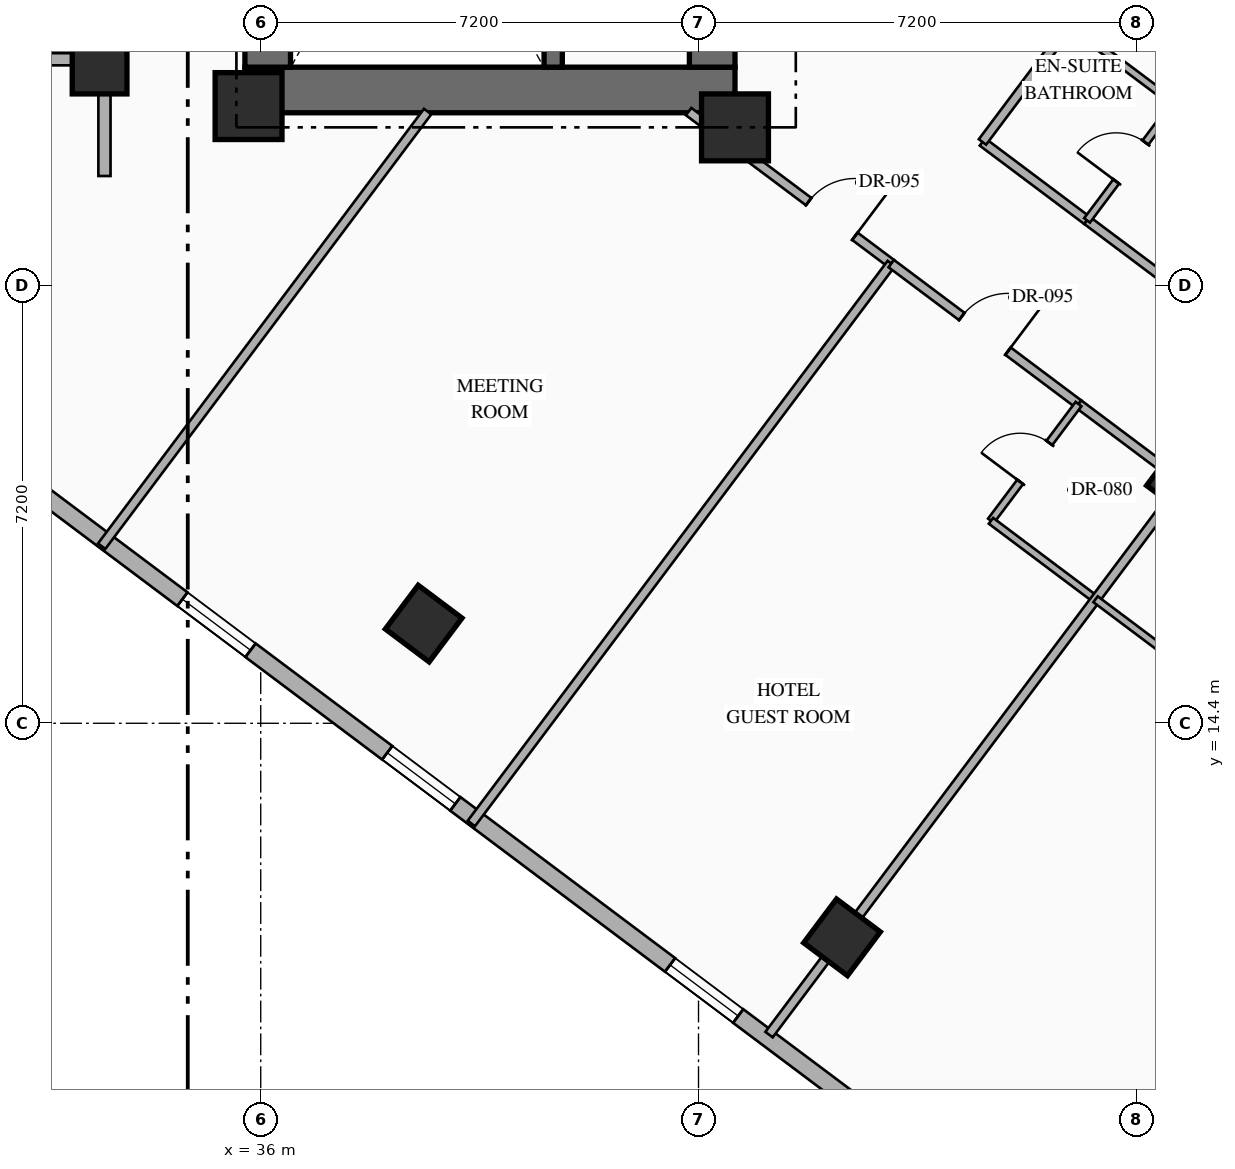
"""IFC4 building model, lengths in metres.
Left out: names, types, materials, properties, quantities, classifications, styles, units other than length and angle.
Written with IfcOpenShell. Run it as: python <this file> out.ifc"""

import sys

from ifc_helpers import new_model, si_unit, direction, frame, frame_2d, origin, origin_2d, place, context, subcontext, project, spatial, rectangle, hollow_rectangle, extrude, element, fill, save


model = new_model("IFC4")
c1 = context("Model", 3, precision=1e-05, world=origin(), true_north=direction((0.0, 1.0)))
c2 = subcontext(c1, "Body", "Model", "MODEL_VIEW")
j1 = project(units=[si_unit("LENGTHUNIT", "METRE"), si_unit("PLANEANGLEUNIT", "RADIAN")], contexts=[c1])
p1 = place(None, origin())
s1 = spatial("IfcSite", under=j1, at=p1, CompositionType="ELEMENT")
p2 = place(p1, origin())
s2 = spatial("IfcBuilding", under=s1, at=p2, CompositionType="ELEMENT")
p3 = place(p2, frame((0.0, 0.0, 77.95)))
s3 = spatial("IfcBuildingStorey", under=s2, at=p3, CompositionType="ELEMENT", Elevation=77.95)
p4 = place(p3, frame((35.74, 24.815, 0.0), z_axis=(0.0, 0.0, 1.0), x_axis=(1.0, 0.0, 0.0)))
e1 = element("IfcWall", 1, at=p4, inside=s3, PredefinedType="SHEAR", context=c2, shape_type="SweptSolid", body=[
    extrude(rectangle(XDim=8.06, YDim=0.75, at=frame_2d((4.03, 0.0))), origin(), (0.0, 0.0, 1.0), 3.35),
])
p5 = place(p3, frame((36.115, 25.19, 0.0), z_axis=(0.0, 0.0, 1.0), x_axis=(0.0, 1.0, 0.0)))
e2 = element("IfcWall", 2, at=p5, inside=s3, PredefinedType="SHEAR", context=c2, shape_type="SweptSolid", body=[
    extrude(rectangle(XDim=9.48, YDim=0.75, at=frame_2d((4.74, 0.0))), origin(), (0.0, 0.0, 1.0), 3.35),
])
p6 = place(p3, frame((43.425, 25.19, 0.0), z_axis=(0.0, 0.0, 1.0), x_axis=(0.0, 1.0, 0.0)))
e3 = element("IfcWall", 3, at=p6, inside=s3, PredefinedType="SHEAR", context=c2, shape_type="SweptSolid", body=[
    extrude(rectangle(XDim=9.48, YDim=0.75, at=frame_2d((4.74, 0.0))), origin(), (0.0, 0.0, 1.0), 3.35),
])
p7 = place(p6, frame((1.21, 0.0, 0.0)))
e4 = element("IfcOpeningElement", 4, at=p7, cuts=e3, PredefinedType="OPENING", context=c2, shape_type="SweptSolid", body=[
    extrude(rectangle(XDim=0.85, YDim=2.08, at=frame_2d((0.425, 1.04))), frame((0.0, 0.385, 0.0), z_axis=(0.0, -1.0, 0.0), x_axis=(1.0, 0.0, 0.0)), (0.0, 0.0, 1.0), 0.77),
])
p8 = place(p6, frame((4.46, 0.0, 0.0)))
e5 = element("IfcOpeningElement", 5, at=p8, cuts=e3, PredefinedType="OPENING", context=c2, shape_type="SweptSolid", body=[
    extrude(rectangle(XDim=0.85, YDim=2.08, at=frame_2d((0.425, 1.04))), frame((0.0, 0.385, 0.0), z_axis=(0.0, -1.0, 0.0), x_axis=(1.0, 0.0, 0.0)), (0.0, 0.0, 1.0), 0.77),
])
p9 = place(p3, frame((40.81, 25.19, 0.0), z_axis=(0.0, 0.0, 1.0), x_axis=(0.0, 1.0, 0.0)))
e6 = element("IfcWall", 6, at=p9, inside=s3, PredefinedType="SHEAR", context=c2, shape_type="SweptSolid", body=[
    extrude(rectangle(XDim=9.48, YDim=0.3, at=frame_2d((4.74, 0.0))), origin(), (0.0, 0.0, 1.0), 3.35),
])
for number, where, z_axis, x_axis in (
    (7, (35.8, 24.55, 0.0), (0.0, 0.0, 1.0), (1.0, 0.0, 0.0)),
    (8, (43.8, 24.2, 0.0), (0.0, 0.0, 1.0), (1.0, 0.0, 0.0)),
):
    element("IfcColumn", number, at=place(p3, frame(where, z_axis=z_axis, x_axis=x_axis)), inside=s3, PredefinedType="COLUMN", context=c2, shape_type="SweptSolid", body=[
        extrude(rectangle(XDim=1.1, YDim=1.1, at=origin_2d()), origin(), (0.0, 0.0, 1.0), 3.35),
    ])
for number, where, z_axis, x_axis in (
    (9, (33.35, 25.2, 0.0), (0.0, 0.0, 1.0), (1.0, 0.0, 0.0)),
    (10, (38.68, 16.04, 0.0), (0.0, 0.0, 1.0), (0.8, -0.6, 0.0)),
    (11, (45.56, 10.88, 0.0), (0.0, 0.0, 1.0), (0.8, -0.6, 0.0)),
    (12, (51.2, 18.4, 0.0), (0.0, 0.0, 1.0), (0.8, -0.6, 0.0)),
):
    element("IfcColumn", number, at=place(p3, frame(where, z_axis=z_axis, x_axis=x_axis)), inside=s3, PredefinedType="COLUMN", context=c2, shape_type="SweptSolid", body=[
        extrude(hollow_rectangle(XDim=0.9, YDim=0.9, WallThickness=0.036, at=origin_2d()), origin(), (0.0, 0.0, 1.0), 3.35),
    ])
p10 = place(p3, frame((44.86, 40.73, 0.0), z_axis=(0.0, 0.0, 1.0), x_axis=(0.800006902154, -0.599990797017, 0.0)))
e13 = element("IfcWall", 13, at=p10, inside=s3, PredefinedType="STANDARD", context=c2, shape_type="SweptSolid", body=[
    extrude(rectangle(XDim=29.712, YDim=0.28, at=frame_2d((14.856, 0.0))), origin(), (0.0, 0.0, 1.0), 3.13),
])
p11 = place(p10, frame((14.249, 0.0, 0.0)))
e14 = element("IfcOpeningElement", 14, at=p11, cuts=e13, PredefinedType="OPENING", context=c2, shape_type="SweptSolid", body=[
    extrude(rectangle(XDim=1.1, YDim=2.2, at=frame_2d((0.55, 1.1))), frame((0.0, 0.15, 0.0), z_axis=(0.0, -1.0, 0.0), x_axis=(1.0, 0.0, 0.0)), (0.0, 0.0, 1.0), 0.3),
])
p12 = place(p10, frame((1.612, 0.0, 0.85)))
e15 = element("IfcOpeningElement", 15, at=p12, cuts=e13, PredefinedType="OPENING", context=c2, shape_type="SweptSolid", body=[
    extrude(rectangle(XDim=1.4, YDim=1.8, at=frame_2d((0.7, 0.9))), frame((0.0, 0.15, 0.0), z_axis=(0.0, -1.0, 0.0), x_axis=(1.0, 0.0, 0.0)), (0.0, 0.0, 1.0), 0.3),
])
p13 = place(p10, frame((5.667, 0.0, 0.85)))
e16 = element("IfcOpeningElement", 16, at=p13, cuts=e13, PredefinedType="OPENING", context=c2, shape_type="SweptSolid", body=[
    extrude(rectangle(XDim=1.4, YDim=1.8, at=frame_2d((0.7, 0.9))), frame((0.0, 0.15, 0.0), z_axis=(0.0, -1.0, 0.0), x_axis=(1.0, 0.0, 0.0)), (0.0, 0.0, 1.0), 0.3),
])
p14 = place(p10, frame((9.912, 0.0, 0.85)))
e17 = element("IfcOpeningElement", 17, at=p14, cuts=e13, PredefinedType="OPENING", context=c2, shape_type="SweptSolid", body=[
    extrude(rectangle(XDim=1.4, YDim=1.8, at=frame_2d((0.7, 0.9))), frame((0.0, 0.15, 0.0), z_axis=(0.0, -1.0, 0.0), x_axis=(1.0, 0.0, 0.0)), (0.0, 0.0, 1.0), 0.3),
])
p15 = place(p10, frame((19.743, 0.0, 0.85)))
e18 = element("IfcOpeningElement", 18, at=p15, cuts=e13, PredefinedType="OPENING", context=c2, shape_type="SweptSolid", body=[
    extrude(rectangle(XDim=1.4, YDim=1.8, at=frame_2d((0.7, 0.9))), frame((0.0, 0.15, 0.0), z_axis=(0.0, -1.0, 0.0), x_axis=(1.0, 0.0, 0.0)), (0.0, 0.0, 1.0), 0.3),
])
p16 = place(p10, frame((22.645, 0.0, 0.85)))
e19 = element("IfcOpeningElement", 19, at=p16, cuts=e13, PredefinedType="OPENING", context=c2, shape_type="SweptSolid", body=[
    extrude(rectangle(XDim=1.4, YDim=1.8, at=frame_2d((0.7, 0.9))), frame((0.0, 0.15, 0.0), z_axis=(0.0, -1.0, 0.0), x_axis=(1.0, 0.0, 0.0)), (0.0, 0.0, 1.0), 0.3),
])
p17 = place(p10, frame((26.7, 0.0, 0.85)))
e20 = element("IfcOpeningElement", 20, at=p17, cuts=e13, PredefinedType="OPENING", context=c2, shape_type="SweptSolid", body=[
    extrude(rectangle(XDim=1.4, YDim=1.8, at=frame_2d((0.7, 0.9))), frame((0.0, 0.15, 0.0), z_axis=(0.0, -1.0, 0.0), x_axis=(1.0, 0.0, 0.0)), (0.0, 0.0, 1.0), 0.3),
])
p18 = place(p3, frame((53.318, 2.487, 0.0), z_axis=(0.0, 0.0, 1.0), x_axis=(-0.800004174678, 0.599994433723, 0.0)))
e21 = element("IfcWall", 21, at=p18, inside=s3, PredefinedType="STANDARD", context=c2, shape_type="SweptSolid", body=[
    extrude(rectangle(XDim=35.089, YDim=0.28, at=frame_2d((17.544, 0.0))), origin(), (0.0, 0.0, 1.0), 3.13),
])
p19 = place(p18, frame((1.931, 0.0, 0.85)))
e22 = element("IfcOpeningElement", 22, at=p19, cuts=e21, PredefinedType="OPENING", context=c2, shape_type="SweptSolid", body=[
    extrude(rectangle(XDim=1.4, YDim=1.8, at=frame_2d((0.7, 0.9))), frame((0.0, 0.15, 0.0), z_axis=(0.0, -1.0, 0.0), x_axis=(1.0, 0.0, 0.0)), (0.0, 0.0, 1.0), 0.3),
])
p20 = place(p18, frame((6.819, 0.0, 0.85)))
e23 = element("IfcOpeningElement", 23, at=p20, cuts=e21, PredefinedType="OPENING", context=c2, shape_type="SweptSolid", body=[
    extrude(rectangle(XDim=1.4, YDim=1.8, at=frame_2d((0.7, 0.9))), frame((0.0, 0.15, 0.0), z_axis=(0.0, -1.0, 0.0), x_axis=(1.0, 0.0, 0.0)), (0.0, 0.0, 1.0), 0.3),
])
p21 = place(p18, frame((11.832, 0.0, 0.85)))
e24 = element("IfcOpeningElement", 24, at=p21, cuts=e21, PredefinedType="OPENING", context=c2, shape_type="SweptSolid", body=[
    extrude(rectangle(XDim=1.4, YDim=1.8, at=frame_2d((0.7, 0.9))), frame((0.0, 0.15, 0.0), z_axis=(0.0, -1.0, 0.0), x_axis=(1.0, 0.0, 0.0)), (0.0, 0.0, 1.0), 0.3),
])
p22 = place(p18, frame((17.647, 0.0, 0.85)))
e25 = element("IfcOpeningElement", 25, at=p22, cuts=e21, PredefinedType="OPENING", context=c2, shape_type="SweptSolid", body=[
    extrude(rectangle(XDim=1.4, YDim=1.8, at=frame_2d((0.7, 0.9))), frame((0.0, 0.15, 0.0), z_axis=(0.0, -1.0, 0.0), x_axis=(1.0, 0.0, 0.0)), (0.0, 0.0, 1.0), 0.3),
])
p23 = place(p18, frame((21.857, 0.0, 0.85)))
e26 = element("IfcOpeningElement", 26, at=p23, cuts=e21, PredefinedType="OPENING", context=c2, shape_type="SweptSolid", body=[
    extrude(rectangle(XDim=1.4, YDim=1.8, at=frame_2d((0.7, 0.9))), frame((0.0, 0.15, 0.0), z_axis=(0.0, -1.0, 0.0), x_axis=(1.0, 0.0, 0.0)), (0.0, 0.0, 1.0), 0.3),
])
p24 = place(p18, frame((26.87, 0.0, 0.85)))
e27 = element("IfcOpeningElement", 27, at=p24, cuts=e21, PredefinedType="OPENING", context=c2, shape_type="SweptSolid", body=[
    extrude(rectangle(XDim=1.4, YDim=1.8, at=frame_2d((0.7, 0.9))), frame((0.0, 0.15, 0.0), z_axis=(0.0, -1.0, 0.0), x_axis=(1.0, 0.0, 0.0)), (0.0, 0.0, 1.0), 0.3),
])
p25 = place(p18, frame((31.757, 0.0, 0.85)))
e28 = element("IfcOpeningElement", 28, at=p25, cuts=e21, PredefinedType="OPENING", context=c2, shape_type="SweptSolid", body=[
    extrude(rectangle(XDim=1.4, YDim=1.8, at=frame_2d((0.7, 0.9))), frame((0.0, 0.15, 0.0), z_axis=(0.0, -1.0, 0.0), x_axis=(1.0, 0.0, 0.0)), (0.0, 0.0, 1.0), 0.3),
])
p26 = place(p3, frame((33.43, 23.4, 0.0), z_axis=(0.0, 0.0, 1.0), x_axis=(0.0, 1.0, 0.0)))
e29 = element("IfcWall", 29, at=p26, inside=s3, PredefinedType="STANDARD", context=c2, shape_type="SweptSolid", body=[
    extrude(rectangle(XDim=4.08, YDim=0.2, at=frame_2d((2.04, 0.0))), origin(), (0.0, 0.0, 1.0), 2.425),
])
p27 = place(p3, frame((25.55, 25.32, 0.0), z_axis=(0.0, 0.0, 1.0), x_axis=(1.0, 0.0, 0.0)))
e30 = element("IfcWall", 30, at=p27, inside=s3, PredefinedType="STANDARD", context=c2, shape_type="SweptSolid", body=[
    extrude(rectangle(XDim=7.88, YDim=0.2, at=frame_2d((3.94, 0.0))), origin(), (0.0, 0.0, 1.0), 2.525),
])
p28 = place(p3, frame((43.037, 24.46, 0.0), z_axis=(0.0, 0.0, 1.0), x_axis=(0.799971872363, -0.600037501685, 0.0)))
e31 = element("IfcWall", 31, at=p28, inside=s3, PredefinedType="PARTITIONING", context=c2, shape_type="SweptSolid", body=[
    extrude(rectangle(XDim=4.167, YDim=0.15, at=frame_2d((2.083, 0.0))), origin(), (0.0, 0.0, 1.0), 2.425),
])
p29 = place(p28, frame((2.468, 0.0, 0.0)))
e32 = element("IfcOpeningElement", 32, at=p29, cuts=e31, PredefinedType="OPENING", context=c2, shape_type="SweptSolid", body=[
    extrude(rectangle(XDim=0.95, YDim=2.15, at=frame_2d((0.475, 1.075))), frame((0.0, 0.085, 0.0), z_axis=(0.0, -1.0, 0.0), x_axis=(1.0, 0.0, 0.0)), (0.0, 0.0, 1.0), 0.17),
])
p30 = place(p3, frame((33.384, 17.312, 0.0), z_axis=(0.0, 0.0, 1.0), x_axis=(0.600008743659, 0.799993442181, 0.0)))
e33 = element("IfcWall", 33, at=p30, inside=s3, PredefinedType="PARTITIONING", context=c2, shape_type="SweptSolid", body=[
    extrude(rectangle(XDim=8.935, YDim=0.15, at=frame_2d((4.468, 0.0))), origin(), (0.0, 0.0, 1.0), 3.13),
])
p31 = place(p3, frame((39.464, 12.752, 0.0), z_axis=(0.0, 0.0, 1.0), x_axis=(0.6, 0.8, 0.0)))
e34 = element("IfcWall", 34, at=p31, inside=s3, PredefinedType="PARTITIONING", context=c2, shape_type="SweptSolid", body=[
    extrude(rectangle(XDim=11.51, YDim=0.15, at=frame_2d((5.755, 0.0))), origin(), (0.0, 0.0, 1.0), 3.13),
])
p32 = place(p3, frame((47.87, 23.96, 0.0), z_axis=(0.0, 0.0, 1.0), x_axis=(0.79998637334, -0.60001816845, 0.0)))
e35 = element("IfcWall", 35, at=p32, inside=s3, PredefinedType="PARTITIONING", context=c2, shape_type="SweptSolid", body=[
    extrude(rectangle(XDim=2.15, YDim=0.15, at=frame_2d((1.075, 0.0))), origin(), (0.0, 0.0, 1.0), 2.775),
])
p33 = place(p3, frame((49.59, 22.67, 0.0), z_axis=(0.0, 0.0, 1.0), x_axis=(0.799993416095, -0.600008778439, 0.0)))
e36 = element("IfcWall", 36, at=p33, inside=s3, PredefinedType="PARTITIONING", context=c2, shape_type="SweptSolid", body=[
    extrude(rectangle(XDim=4.45, YDim=0.15, at=frame_2d((2.225, 0.0))), origin(), (0.0, 0.0, 1.0), 2.775),
])
p34 = place(p33, frame((1.75, 0.0, 0.0)))
e37 = element("IfcOpeningElement", 37, at=p34, cuts=e36, PredefinedType="OPENING", context=c2, shape_type="SweptSolid", body=[
    extrude(rectangle(XDim=0.95, YDim=2.15, at=frame_2d((0.475, 1.075))), frame((0.0, 0.085, 0.0), z_axis=(0.0, -1.0, 0.0), x_axis=(1.0, 0.0, 0.0)), (0.0, 0.0, 1.0), 0.17),
])
p35 = place(p3, frame((49.59, 22.67, 0.0), z_axis=(0.0, 0.0, 1.0), x_axis=(0.599951172744, 0.800036618114, 0.0)))
e38 = element("IfcWall", 38, at=p35, inside=s3, PredefinedType="PARTITIONING", context=c2, shape_type="SweptSolid", body=[
    extrude(rectangle(XDim=2.4, YDim=0.12, at=frame_2d((1.2, 0.0))), origin(), (0.0, 0.0, 1.0), 3.13),
])
p36 = place(p35, frame((0.8, 0.0, 0.0)))
e39 = element("IfcOpeningElement", 39, at=p36, cuts=e38, PredefinedType="OPENING", context=c2, shape_type="SweptSolid", body=[
    extrude(rectangle(XDim=0.8, YDim=2.06, at=frame_2d((0.4, 1.03))), frame((0.0, 0.07, 0.0), z_axis=(0.0, -1.0, 0.0), x_axis=(1.0, 0.0, 0.0)), (0.0, 0.0, 1.0), 0.14),
])
p37 = place(p3, frame((49.31, 25.88, 0.0), z_axis=(0.0, 0.0, 1.0), x_axis=(0.800040880289, -0.59994548908, 0.0)))
e40 = element("IfcWall", 40, at=p37, inside=s3, PredefinedType="PARTITIONING", context=c2, shape_type="SweptSolid", body=[
    extrude(rectangle(XDim=2.15, YDim=0.12, at=frame_2d((1.075, 0.0))), origin(), (0.0, 0.0, 1.0), 3.13),
])
p38 = place(p3, frame((47.87, 23.96, 0.0), z_axis=(0.0, 0.0, 1.0), x_axis=(0.599996617946, 0.80000253653, 0.0)))
e41 = element("IfcWall", 41, at=p38, inside=s3, PredefinedType="PARTITIONING", context=c2, shape_type="SweptSolid", body=[
    extrude(rectangle(XDim=11.55, YDim=0.15, at=frame_2d((5.775, 0.0))), origin(), (0.0, 0.0, 1.0), 3.13),
])
p39 = place(p3, frame((46.37, 21.96, 0.0), z_axis=(0.0, 0.0, 1.0), x_axis=(0.799977170108, -0.600030438649, 0.0)))
e42 = element("IfcWall", 42, at=p39, inside=s3, PredefinedType="PARTITIONING", context=c2, shape_type="SweptSolid", body=[
    extrude(rectangle(XDim=3.85, YDim=0.15, at=frame_2d((1.925, 0.0))), origin(), (0.0, 0.0, 1.0), 2.425),
])
p40 = place(p39, frame((1.45, 0.0, 0.0)))
e43 = element("IfcOpeningElement", 43, at=p40, cuts=e42, PredefinedType="OPENING", context=c2, shape_type="SweptSolid", body=[
    extrude(rectangle(XDim=0.95, YDim=2.15, at=frame_2d((0.475, 1.075))), frame((0.0, 0.085, 0.0), z_axis=(0.0, -1.0, 0.0), x_axis=(1.0, 0.0, 0.0)), (0.0, 0.0, 1.0), 0.17),
])
p41 = place(p3, frame((49.45, 19.65, 0.0), z_axis=(0.0, 0.0, 1.0), x_axis=(0.800040880289, -0.59994548908, 0.0)))
e44 = element("IfcWall", 44, at=p41, inside=s3, PredefinedType="PARTITIONING", context=c2, shape_type="SweptSolid", body=[
    extrude(rectangle(XDim=2.15, YDim=0.15, at=frame_2d((1.075, 0.0))), origin(), (0.0, 0.0, 1.0), 2.425),
])
p42 = place(p3, frame((48.01, 17.73, 0.0), z_axis=(0.0, 0.0, 1.0), x_axis=(0.6, 0.8, 0.0)))
e45 = element("IfcWall", 45, at=p42, inside=s3, PredefinedType="PARTITIONING", context=c2, shape_type="SweptSolid", body=[
    extrude(rectangle(XDim=2.4, YDim=0.12, at=frame_2d((1.2, 0.0))), origin(), (0.0, 0.0, 1.0), 3.13),
])
p43 = place(p42, frame((0.8, 0.0, 0.0)))
e46 = element("IfcOpeningElement", 46, at=p43, cuts=e45, PredefinedType="OPENING", context=c2, shape_type="SweptSolid", body=[
    extrude(rectangle(XDim=0.8, YDim=2.06, at=frame_2d((0.4, 1.03))), frame((0.0, 0.07, 0.0), z_axis=(0.0, -1.0, 0.0), x_axis=(1.0, 0.0, 0.0)), (0.0, 0.0, 1.0), 0.14),
])
p44 = place(p3, frame((48.01, 17.73, 0.0), z_axis=(0.0, 0.0, 1.0), x_axis=(0.79998637334, -0.60001816845, 0.0)))
e47 = element("IfcWall", 47, at=p44, inside=s3, PredefinedType="PARTITIONING", context=c2, shape_type="SweptSolid", body=[
    extrude(rectangle(XDim=2.15, YDim=0.12, at=frame_2d((1.075, 0.0))), origin(), (0.0, 0.0, 1.0), 3.13),
])
p45 = place(p3, frame((44.36, 9.28, 0.0), z_axis=(0.0, 0.0, 1.0), x_axis=(0.599986233332, 0.800010324816, 0.0)))
e48 = element("IfcWall", 48, at=p45, inside=s3, PredefinedType="PARTITIONING", context=c2, shape_type="SweptSolid", body=[
    extrude(rectangle(XDim=11.35, YDim=0.15, at=frame_2d((5.675, 0.0))), origin(), (0.0, 0.0, 1.0), 2.425),
])
p46 = place(p3, frame((49.73, 16.44, 0.0), z_axis=(0.0, 0.0, 1.0), x_axis=(0.79998637334, -0.60001816845, 0.0)))
e49 = element("IfcWall", 49, at=p46, inside=s3, PredefinedType="PARTITIONING", context=c2, shape_type="SweptSolid", body=[
    extrude(rectangle(XDim=2.15, YDim=0.12, at=frame_2d((1.075, 0.0))), origin(), (0.0, 0.0, 1.0), 3.13),
])
p47 = place(p21, origin())
e50 = element("IfcWindow", 50, at=p47, inside=s3, PartitioningType="SINGLE_PANEL", PredefinedType="WINDOW", context=c2, shape_type="SweptSolid", body=[
    extrude(rectangle(XDim=1.4, YDim=1.8, at=frame_2d((0.7, 0.9))), frame((0.0, 0.03, 0.0), z_axis=(0.0, -1.0, 0.0), x_axis=(1.0, 0.0, 0.0)), (0.0, 0.0, 1.0), 0.06),
])
fill(e24, e50)
p48 = place(p22, origin())
e51 = element("IfcWindow", 51, at=p48, inside=s3, PartitioningType="SINGLE_PANEL", PredefinedType="WINDOW", context=c2, shape_type="SweptSolid", body=[
    extrude(rectangle(XDim=1.4, YDim=1.8, at=frame_2d((0.7, 0.9))), frame((0.0, 0.03, 0.0), z_axis=(0.0, -1.0, 0.0), x_axis=(1.0, 0.0, 0.0)), (0.0, 0.0, 1.0), 0.06),
])
fill(e25, e51)
p49 = place(p23, origin())
e52 = element("IfcWindow", 52, at=p49, inside=s3, PartitioningType="SINGLE_PANEL", PredefinedType="WINDOW", context=c2, shape_type="SweptSolid", body=[
    extrude(rectangle(XDim=1.4, YDim=1.8, at=frame_2d((0.7, 0.9))), frame((0.0, 0.03, 0.0), z_axis=(0.0, -1.0, 0.0), x_axis=(1.0, 0.0, 0.0)), (0.0, 0.0, 1.0), 0.06),
])
fill(e26, e52)
p50 = place(p29, origin())
e53 = element("IfcDoor", 53, at=p50, inside=s3, OperationType="SINGLE_SWING_RIGHT", PredefinedType="DOOR", context=c2, shape_type="SweptSolid", body=[
    extrude(rectangle(XDim=0.95, YDim=2.15, at=frame_2d((0.475, 1.075))), frame((0.0, 0.025, 0.0), z_axis=(0.0, -1.0, 0.0), x_axis=(1.0, 0.0, 0.0)), (0.0, 0.0, 1.0), 0.05),
])
fill(e32, e53)
p51 = place(p36, origin())
e54 = element("IfcDoor", 54, at=p51, inside=s3, OperationType="SINGLE_SWING_LEFT", PredefinedType="DOOR", context=c2, shape_type="SweptSolid", body=[
    extrude(rectangle(XDim=0.8, YDim=2.06, at=frame_2d((0.4, 1.03))), frame((0.0, 0.025, 0.0), z_axis=(0.0, -1.0, 0.0), x_axis=(1.0, 0.0, 0.0)), (0.0, 0.0, 1.0), 0.05),
])
fill(e39, e54)
p52 = place(p40, origin())
e55 = element("IfcDoor", 55, at=p52, inside=s3, OperationType="SINGLE_SWING_RIGHT", PredefinedType="DOOR", context=c2, shape_type="SweptSolid", body=[
    extrude(rectangle(XDim=0.95, YDim=2.15, at=frame_2d((0.475, 1.075))), frame((0.0, 0.025, 0.0), z_axis=(0.0, -1.0, 0.0), x_axis=(1.0, 0.0, 0.0)), (0.0, 0.0, 1.0), 0.05),
])
fill(e43, e55)
p53 = place(p43, origin())
e56 = element("IfcDoor", 56, at=p53, inside=s3, OperationType="SINGLE_SWING_LEFT", PredefinedType="DOOR", context=c2, shape_type="SweptSolid", body=[
    extrude(rectangle(XDim=0.8, YDim=2.06, at=frame_2d((0.4, 1.03))), frame((0.0, 0.025, 0.0), z_axis=(0.0, -1.0, 0.0), x_axis=(1.0, 0.0, 0.0)), (0.0, 0.0, 1.0), 0.05),
])
fill(e46, e56)
save(model, sys.argv[1])
